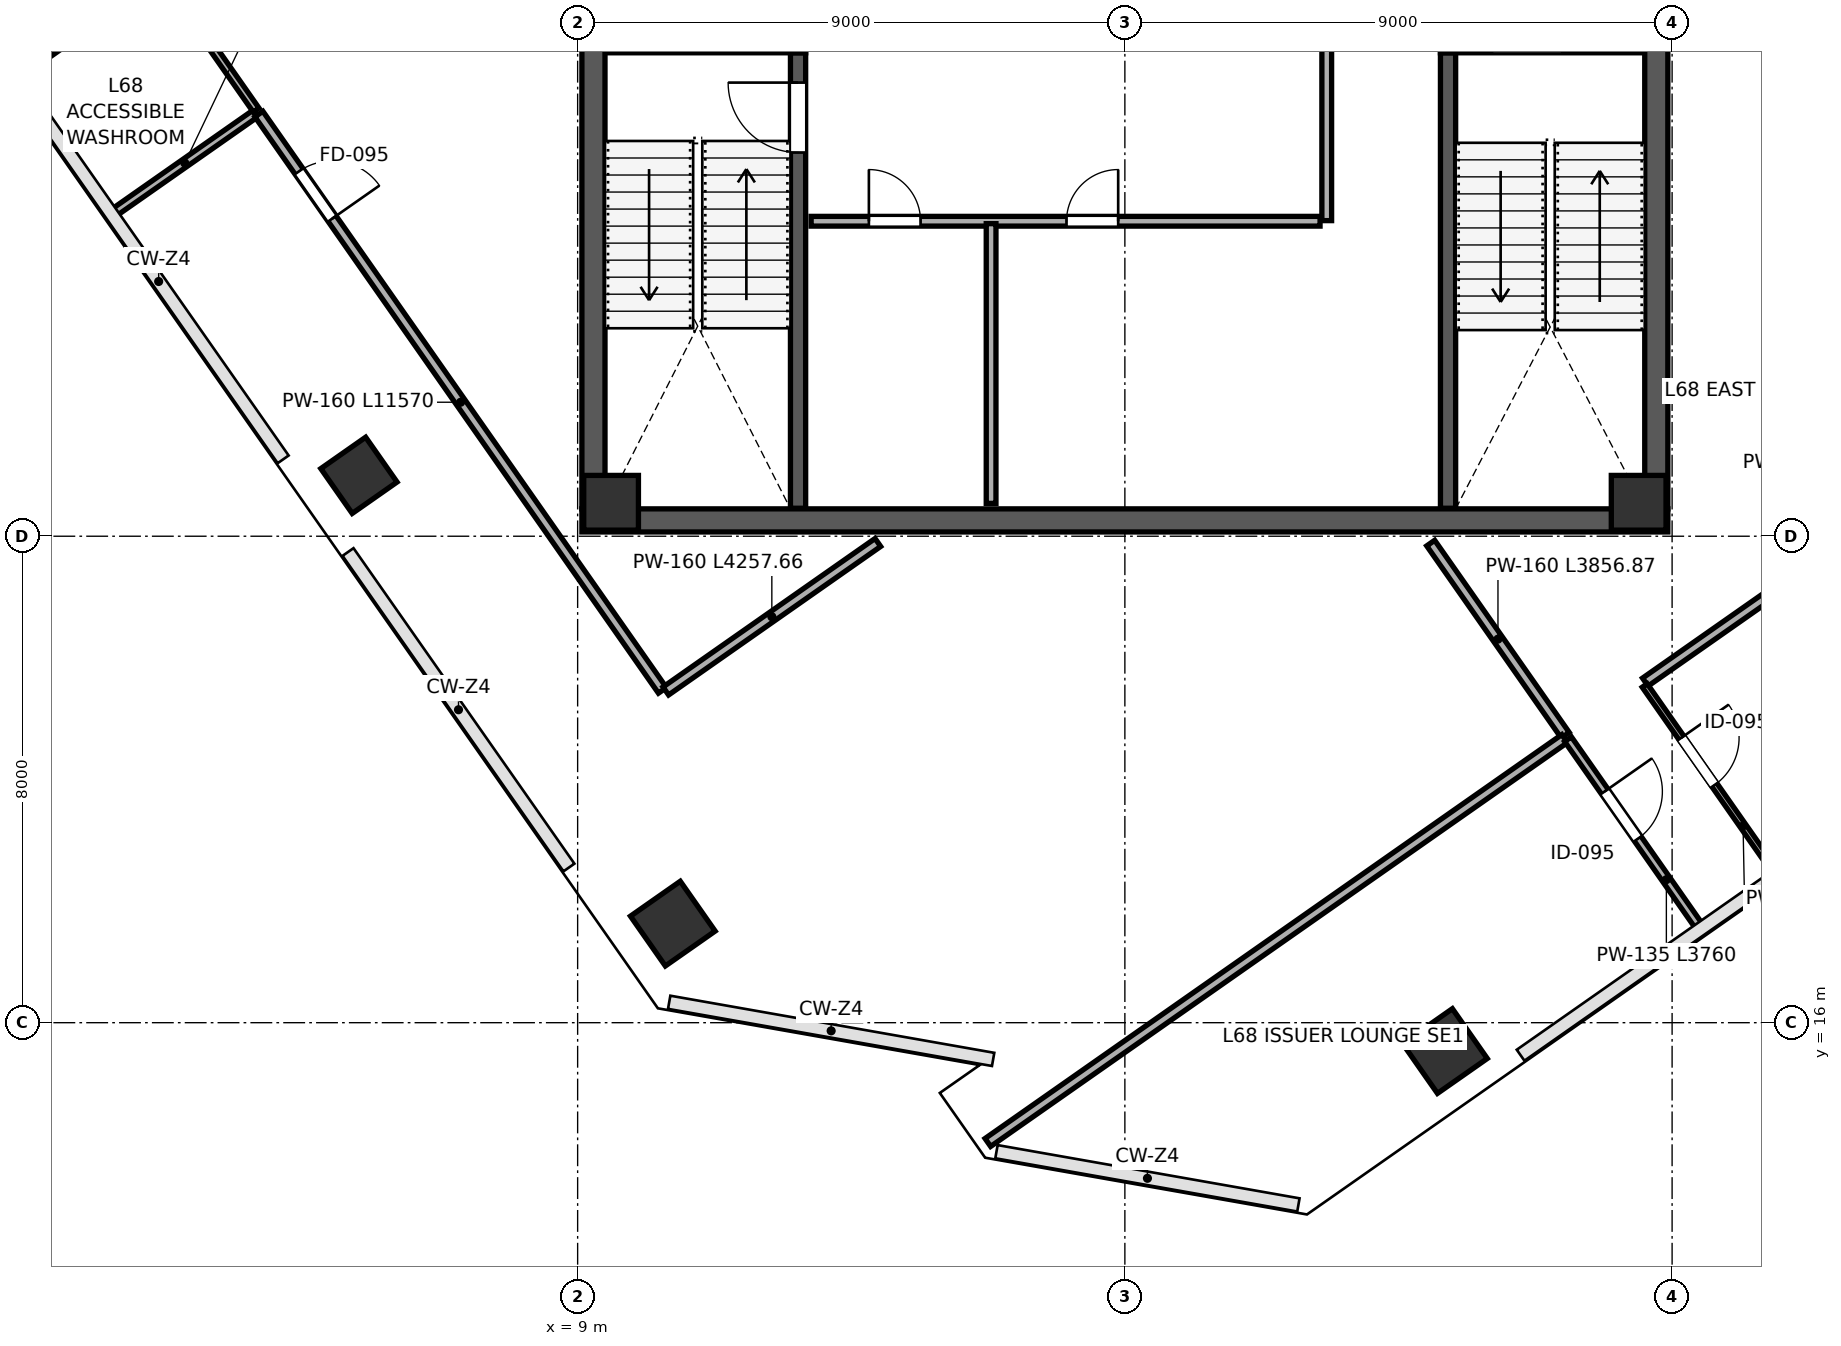
"""IFC4 building model, lengths in metres.
Left out: names, types, materials, properties, quantities, classifications, styles, units other than length and angle.
Written with IfcOpenShell. Run it as: python <this file> out.ifc"""

import sys

from ifc_helpers import new_model, si_unit, direction, frame, frame_2d, origin, origin_2d, place, context, subcontext, project, spatial, rectangle, extrude, clip, halfspace, source, transform, mapped, element, fill, save


model = new_model("IFC4")
c1 = context("Model", 3, precision=1e-05, world=origin(), true_north=direction((0.0, 1.0)))
c2 = subcontext(c1, "Body", "Model", "MODEL_VIEW")
j1 = project(units=[si_unit("LENGTHUNIT", "METRE"), si_unit("PLANEANGLEUNIT", "RADIAN")], contexts=[c1])
p1 = place(None, origin())
s1 = spatial("IfcSite", under=j1, at=p1, CompositionType="ELEMENT")
p2 = place(p1, origin())
s2 = spatial("IfcBuilding", under=s1, at=p2, CompositionType="ELEMENT")
p3 = place(p2, frame((0.0, 0.0, 303.0)))
s3 = spatial("IfcBuildingStorey", under=s2, at=p3, CompositionType="ELEMENT", Elevation=303.0)
m1 = source(origin(), c2, "Body", "SweptSolid", [
    extrude(rectangle(XDim=0.9, YDim=0.9, at=origin_2d()), origin(), (0.0, 0.0, 1.0), 4.198),
])
for number, where, z_axis, x_axis in (
    (1, (9.55, 24.55, 0.001), (0.0, 0.0, 1.0), (1.0, 0.0, 0.0)),
    (2, (26.45, 24.55, 0.001), (0.0, 0.0, 1.0), (1.0, 0.0, 0.0)),
):
    element("IfcColumn", number, at=place(p3, frame(where, z_axis=z_axis, x_axis=x_axis)), inside=s3, PredefinedType="COLUMN", context=c2, shape_type="MappedRepresentation", body=[
        mapped(m1, transform((0.0, 0.0, 0.0), scale=1.0)),
    ])
p4 = place(p3, frame((0.241, 32.374, 0.0), z_axis=(0.008457413638, 0.215522144854, 0.976462327605), x_axis=(0.541771313725, -0.821746656519, 0.176681284024)))
e3 = element("IfcColumn", 3, at=p4, inside=s3, PredefinedType="COLUMN", context=c2, shape_type="Clipping", body=[
    clip(clip(extrude(rectangle(XDim=0.9, YDim=0.9, at=origin_2d()), origin(), (0.0, 0.0, 1.0), 4.301), halfspace(frame((0.0, 0.0, 0.139), z_axis=(0.0, 0.0, -1.0), x_axis=(1.0, 0.0, 0.0)), False)), halfspace(frame((0.0, 0.0, 4.162), z_axis=(0.0, 0.0, 1.0), x_axis=(1.0, 0.0, 0.0)), False)),
])
p5 = place(p3, frame((5.403, 25.001, 0.0), z_axis=(-0.06793764826, 0.166012620285, 0.983780608599), x_axis=(0.836063035578, -0.528590930954, 0.146936136652)))
e4 = element("IfcColumn", 4, at=p5, inside=s3, PredefinedType="COLUMN", context=c2, shape_type="Clipping", body=[
    clip(clip(extrude(rectangle(XDim=0.9, YDim=0.9, at=origin_2d()), origin(), (0.0, 0.0, 1.0), 4.269), halfspace(frame((0.0, 0.0, 0.115), z_axis=(0.0, 0.0, -1.0), x_axis=(1.0, 0.0, 0.0)), False)), halfspace(frame((0.0, 0.0, 4.154), z_axis=(0.0, 0.0, 1.0), x_axis=(1.0, 0.0, 0.0)), False)),
])
p6 = place(p3, frame((10.565, 17.629, 0.0), z_axis=(-0.144260059709, 0.114836720798, 0.98285378502), x_axis=(0.987123386197, -0.0526699781, 0.151040702559)))
e5 = element("IfcColumn", 5, at=p6, inside=s3, PredefinedType="COLUMN", context=c2, shape_type="Clipping", body=[
    clip(clip(extrude(rectangle(XDim=1.0, YDim=1.0, at=origin_2d()), origin(), (0.0, 0.0, 1.0), 4.273), halfspace(frame((0.0, 0.0, 0.131), z_axis=(0.0, 0.0, -1.0), x_axis=(1.0, 0.0, 0.0)), False)), halfspace(frame((0.0, 0.0, 4.142), z_axis=(0.0, 0.0, 1.0), x_axis=(1.0, 0.0, 0.0)), False)),
])
p7 = place(p3, frame((23.264, 15.534, 0.0), z_axis=(-0.168941576354, -0.014379225387, 0.985521172607), x_axis=(0.755740055789, 0.639974029338, 0.1388891999)))
e6 = element("IfcColumn", 6, at=p7, inside=s3, PredefinedType="COLUMN", context=c2, shape_type="Clipping", body=[
    clip(clip(extrude(rectangle(XDim=1.0, YDim=1.0, at=origin_2d()), origin(), (0.0, 0.0, 1.0), 4.262), halfspace(frame((0.0, 0.0, 0.121), z_axis=(0.0, 0.0, -1.0), x_axis=(1.0, 0.0, 0.0)), False)), halfspace(frame((0.0, 0.0, 4.141), z_axis=(0.0, 0.0, 1.0), x_axis=(1.0, 0.0, 0.0)), False)),
])
p8 = place(p3, frame((9.26, 24.45, 0.0), z_axis=(0.0, 0.0, 1.0), x_axis=(0.0, 1.0, 0.0)))
e7 = element("IfcWall", 7, at=p8, inside=s3, PredefinedType="SHEAR", context=c2, shape_type="SweptSolid", body=[
    extrude(rectangle(XDim=15.1, YDim=0.38, at=frame_2d((7.55, 0.0))), origin(), (0.0, 0.0, 1.0), 3.96),
])
p9 = place(p8, frame((8.7, 0.0, 0.0)))
e8 = element("IfcOpeningElement", 8, at=p9, cuts=e7, PredefinedType="OPENING", context=c2, shape_type="SweptSolid", body=[
    extrude(rectangle(XDim=1.15, YDim=2.2, at=frame_2d((0.575, 1.1))), frame((0.0, 0.2, 0.0), z_axis=(0.0, -1.0, 0.0), x_axis=(1.0, 0.0, 0.0)), (0.0, 0.0, 1.0), 0.4),
])
p10 = place(p3, frame((26.74, 24.45, 0.0), z_axis=(0.0, 0.0, 1.0), x_axis=(0.0, 1.0, 0.0)))
e9 = element("IfcWall", 9, at=p10, inside=s3, PredefinedType="SHEAR", context=c2, shape_type="SweptSolid", body=[
    extrude(rectangle(XDim=15.1, YDim=0.38, at=frame_2d((7.55, 0.0))), origin(), (0.0, 0.0, 1.0), 3.96),
])
p11 = place(p10, frame((8.6, 0.0, 0.0)))
e10 = element("IfcOpeningElement", 10, at=p11, cuts=e9, PredefinedType="OPENING", context=c2, shape_type="SweptSolid", body=[
    extrude(rectangle(XDim=1.15, YDim=2.2, at=frame_2d((0.575, 1.1))), frame((0.0, 0.2, 0.0), z_axis=(0.0, -1.0, 0.0), x_axis=(1.0, 0.0, 0.0)), (0.0, 0.0, 1.0), 0.4),
])
p12 = place(p3, frame((9.07, 24.26, 0.0), z_axis=(0.0, 0.0, 1.0), x_axis=(1.0, 0.0, 0.0)))
e11 = element("IfcWall", 11, at=p12, inside=s3, PredefinedType="SHEAR", context=c2, shape_type="SweptSolid", body=[
    extrude(rectangle(XDim=17.86, YDim=0.38, at=frame_2d((8.93, 0.0))), origin(), (0.0, 0.0, 1.0), 3.96),
])
p13 = place(p3, frame((12.625, 24.46, 0.0), z_axis=(0.0, 0.0, 1.0), x_axis=(0.0, 1.0, 0.0)))
e12 = element("IfcWall", 12, at=p13, inside=s3, PredefinedType="SHEAR", context=c2, shape_type="SweptSolid", body=[
    extrude(rectangle(XDim=7.49, YDim=0.25, at=frame_2d((3.745, 0.0))), origin(), (0.0, 0.0, 1.0), 3.96),
])
p14 = place(p13, frame((5.85, 0.0, 0.0)))
e13 = element("IfcOpeningElement", 13, at=p14, cuts=e12, PredefinedType="OPENING", context=c2, shape_type="SweptSolid", body=[
    extrude(rectangle(XDim=1.15, YDim=2.2, at=frame_2d((0.575, 1.1))), frame((0.0, 0.135, 0.0), z_axis=(0.0, -1.0, 0.0), x_axis=(1.0, 0.0, 0.0)), (0.0, 0.0, 1.0), 0.27),
])
p15 = place(p3, frame((9.46, 32.075, 0.0), z_axis=(0.0, 0.0, 1.0), x_axis=(1.0, 0.0, 0.0)))
e14 = element("IfcWall", 14, at=p15, inside=s3, PredefinedType="SHEAR", context=c2, shape_type="SweptSolid", body=[
    extrude(rectangle(XDim=3.29, YDim=0.25, at=frame_2d((1.645, 0.0))), origin(), (0.0, 0.0, 1.0), 3.96),
])
p16 = place(p3, frame((23.315, 24.46, 0.0), z_axis=(0.0, 0.0, 1.0), x_axis=(0.0, 1.0, 0.0)))
e15 = element("IfcWall", 15, at=p16, inside=s3, PredefinedType="SHEAR", context=c2, shape_type="SweptSolid", body=[
    extrude(rectangle(XDim=7.49, YDim=0.25, at=frame_2d((3.745, 0.0))), origin(), (0.0, 0.0, 1.0), 3.96),
])
p17 = place(p3, frame((23.19, 32.075, 0.0), z_axis=(0.0, 0.0, 1.0), x_axis=(1.0, 0.0, 0.0)))
e16 = element("IfcWall", 16, at=p17, inside=s3, PredefinedType="SHEAR", context=c2, shape_type="SweptSolid", body=[
    extrude(rectangle(XDim=3.35, YDim=0.25, at=frame_2d((1.675, 0.0))), origin(), (0.0, 0.0, 1.0), 3.96),
])
p18 = place(p17, frame((0.85, 0.0, 0.0)))
e17 = element("IfcOpeningElement", 17, at=p18, cuts=e16, PredefinedType="OPENING", context=c2, shape_type="SweptSolid", body=[
    extrude(rectangle(XDim=1.15, YDim=2.2, at=frame_2d((0.575, 1.1))), frame((0.0, 0.135, 0.0), z_axis=(0.0, -1.0, 0.0), x_axis=(1.0, 0.0, 0.0)), (0.0, 0.0, 1.0), 0.27),
])
p19 = place(p3, frame((12.84, 29.18, 0.0), z_axis=(0.0, 0.0, 1.0), x_axis=(1.0, 0.0, 0.0)))
e18 = element("IfcWall", 18, at=p19, inside=s3, PredefinedType="PARTITIONING", context=c2, shape_type="SweptSolid", body=[
    extrude(rectangle(XDim=8.37, YDim=0.16, at=frame_2d((4.185, 0.0))), origin(), (0.0, 0.0, 1.0), 3.96),
])
p20 = place(p19, frame((0.95, 0.0, 0.0)))
e19 = element("IfcOpeningElement", 19, at=p20, cuts=e18, PredefinedType="OPENING", context=c2, shape_type="SweptSolid", body=[
    extrude(rectangle(XDim=0.85, YDim=2.1, at=frame_2d((0.425, 1.05))), frame((0.0, 0.09, 0.0), z_axis=(0.0, -1.0, 0.0), x_axis=(1.0, 0.0, 0.0)), (0.0, 0.0, 1.0), 0.18),
])
p21 = place(p19, frame((4.2, 0.0, 0.0)))
e20 = element("IfcOpeningElement", 20, at=p21, cuts=e18, PredefinedType="OPENING", context=c2, shape_type="SweptSolid", body=[
    extrude(rectangle(XDim=0.85, YDim=2.1, at=frame_2d((0.425, 1.05))), frame((0.0, 0.09, 0.0), z_axis=(0.0, -1.0, 0.0), x_axis=(1.0, 0.0, 0.0)), (0.0, 0.0, 1.0), 0.18),
])
p22 = place(p3, frame((15.8, 24.54, 0.0), z_axis=(0.0, 0.0, 1.0), x_axis=(0.0, 1.0, 0.0)))
e21 = element("IfcWall", 21, at=p22, inside=s3, PredefinedType="PARTITIONING", context=c2, shape_type="SweptSolid", body=[
    extrude(rectangle(XDim=4.6, YDim=0.16, at=frame_2d((2.3, 0.0))), origin(), (0.0, 0.0, 1.0), 3.96),
])
p23 = place(p3, frame((21.32, 29.19, 0.0), z_axis=(0.0, 0.0, 1.0), x_axis=(0.0, 1.0, 0.0)))
e22 = element("IfcWall", 22, at=p23, inside=s3, PredefinedType="PARTITIONING", context=c2, shape_type="SweptSolid", body=[
    extrude(rectangle(XDim=2.92, YDim=0.16, at=frame_2d((1.46, 0.0))), origin(), (0.0, 0.0, 1.0), 3.96),
])
p24 = place(p3, frame((-0.431, 31.904, 0.0), z_axis=(0.0, 0.0, 1.0), x_axis=(0.819122867865, 0.573618102347, 0.0)))
e23 = element("IfcWall", 23, at=p24, inside=s3, PredefinedType="PARTITIONING", context=c2, shape_type="SweptSolid", body=[
    extrude(rectangle(XDim=2.84, YDim=0.1, at=frame_2d((1.42, 0.0))), origin(), (0.0, 0.0, 1.0), 3.295),
])
p25 = place(p3, frame((1.376, 29.323, 0.0), z_axis=(0.0, 0.0, 1.0), x_axis=(0.819163257805, 0.573560421458, 0.0)))
e24 = element("IfcWall", 24, at=p25, inside=s3, PredefinedType="PARTITIONING", context=c2, shape_type="SweptSolid", body=[
    extrude(rectangle(XDim=2.84, YDim=0.135, at=frame_2d((1.42, 0.0))), origin(), (0.0, 0.0, 1.0), 3.295),
])
p26 = place(p3, frame((-0.544, 37.086, 0.0), z_axis=(0.0, 0.0, 1.0), x_axis=(0.573568336404, -0.819157715873, 0.0)))
e25 = element("IfcWall", 25, at=p26, inside=s3, PredefinedType="PARTITIONING", context=c2, shape_type="SweptSolid", body=[
    extrude(rectangle(XDim=7.42, YDim=0.115, at=frame_2d((3.71, 0.0))), origin(), (0.0, 0.0, 1.0), 3.96),
])
p27 = place(p26, frame((1.7, 0.0, 0.0)))
e26 = element("IfcOpeningElement", 26, at=p27, cuts=e25, PredefinedType="OPENING", context=c2, shape_type="SweptSolid", body=[
    extrude(rectangle(XDim=0.9, YDim=2.15, at=frame_2d((0.45, 1.075))), frame((0.0, 0.067, 0.0), z_axis=(0.0, -1.0, 0.0), x_axis=(1.0, 0.0, 0.0)), (0.0, 0.0, 1.0), 0.135),
])
p28 = place(p26, frame((5.0, 0.0, 0.0)))
e27 = element("IfcOpeningElement", 27, at=p28, cuts=e25, PredefinedType="OPENING", context=c2, shape_type="SweptSolid", body=[
    extrude(rectangle(XDim=0.95, YDim=2.15, at=frame_2d((0.475, 1.075))), frame((0.0, 0.067, 0.0), z_axis=(0.0, -1.0, 0.0), x_axis=(1.0, 0.0, 0.0)), (0.0, 0.0, 1.0), 0.135),
])
p29 = place(p3, frame((3.758, 30.942, 0.0), z_axis=(0.0, 0.0, 1.0), x_axis=(0.573575634469, -0.819152605772, 0.0)))
e28 = element("IfcWall", 28, at=p29, inside=s3, PredefinedType="PARTITIONING", context=c2, shape_type="SweptSolid", body=[
    extrude(rectangle(XDim=11.57, YDim=0.16, at=frame_2d((5.785, 0.0))), origin(), (0.0, 0.0, 1.0), 3.96),
])
p30 = place(p29, frame((1.15, 0.0, 0.0)))
e29 = element("IfcOpeningElement", 29, at=p30, cuts=e28, PredefinedType="OPENING", context=c2, shape_type="SweptSolid", body=[
    extrude(rectangle(XDim=0.95, YDim=2.15, at=frame_2d((0.475, 1.075))), frame((0.0, 0.09, 0.0), z_axis=(0.0, -1.0, 0.0), x_axis=(1.0, 0.0, 0.0)), (0.0, 0.0, 1.0), 0.18),
])
p31 = place(p3, frame((10.45, 21.455, 0.0), z_axis=(0.0, 0.0, 1.0), x_axis=(0.819110678768, 0.573635507903, 0.0)))
e30 = element("IfcWall", 30, at=p31, inside=s3, PredefinedType="PARTITIONING", context=c2, shape_type="SweptSolid", body=[
    extrude(rectangle(XDim=4.258, YDim=0.16, at=frame_2d((2.129, 0.0))), origin(), (0.0, 0.0, 1.0), 3.96),
])
p32 = place(p3, frame((23.03, 23.887, 0.0), z_axis=(0.0, 0.0, 1.0), x_axis=(0.573602525203, -0.819133776059, 0.0)))
e31 = element("IfcWall", 31, at=p32, inside=s3, PredefinedType="PARTITIONING", context=c2, shape_type="SweptSolid", body=[
    extrude(rectangle(XDim=3.857, YDim=0.16, at=frame_2d((1.928, 0.0))), origin(), (0.0, 0.0, 1.0), 3.96),
])
p33 = place(p3, frame((21.918, 49.884, 0.0), z_axis=(0.0, 0.0, 1.0), x_axis=(0.57358495776, -0.819146077468, 0.0)))
e32 = element("IfcWall", 32, at=p33, inside=s3, PredefinedType="PARTITIONING", context=c2, shape_type="SweptSolid", body=[
    extrude(rectangle(XDim=25.79, YDim=0.1, at=frame_2d((12.895, 0.0))), origin(), (0.0, 0.0, 1.0), 3.96),
])
p34 = place(p33, frame((9.2, 0.0, 0.0)))
e33 = element("IfcOpeningElement", 33, at=p34, cuts=e32, PredefinedType="OPENING", context=c2, shape_type="SweptSolid", body=[
    extrude(rectangle(XDim=0.95, YDim=2.15, at=frame_2d((0.475, 1.075))), frame((0.0, 0.06, 0.0), z_axis=(0.0, -1.0, 0.0), x_axis=(1.0, 0.0, 0.0)), (0.0, 0.0, 1.0), 0.12),
])
p35 = place(p3, frame((26.559, 21.601, 0.0), z_axis=(0.0, 0.0, 1.0), x_axis=(0.819143682501, 0.573588378036, 0.0)))
e34 = element("IfcWall", 34, at=p35, inside=s3, PredefinedType="PARTITIONING", context=c2, shape_type="SweptSolid", body=[
    extrude(rectangle(XDim=9.49, YDim=0.16, at=frame_2d((4.745, 0.0))), origin(), (0.0, 0.0, 1.0), 3.96),
])
p36 = place(p3, frame((15.747, 14.03, 0.0), z_axis=(0.0, 0.0, 1.0), x_axis=(0.819150694041, 0.573578364701, 0.0)))
e35 = element("IfcWall", 35, at=p36, inside=s3, PredefinedType="PARTITIONING", context=c2, shape_type="SweptSolid", body=[
    extrude(rectangle(XDim=11.58, YDim=0.16, at=frame_2d((5.79, 0.0))), origin(), (0.0, 0.0, 1.0), 3.96),
])
p37 = place(p3, frame((26.55, 21.546, 0.0), z_axis=(0.0, 0.0, 1.0), x_axis=(0.573614860738, -0.8191251379, 0.0)))
e36 = element("IfcWall", 36, at=p37, inside=s3, PredefinedType="PARTITIONING", context=c2, shape_type="SweptSolid", body=[
    extrude(rectangle(XDim=3.76, YDim=0.1, at=frame_2d((1.88, 0.0))), origin(), (0.0, 0.0, 1.0), 3.96),
])
p38 = place(p37, frame((1.05, 0.0, 0.0)))
e37 = element("IfcOpeningElement", 37, at=p38, cuts=e36, PredefinedType="OPENING", context=c2, shape_type="SweptSolid", body=[
    extrude(rectangle(XDim=0.95, YDim=2.15, at=frame_2d((0.475, 1.075))), frame((0.0, 0.06, 0.0), z_axis=(0.0, -1.0, 0.0), x_axis=(1.0, 0.0, 0.0)), (0.0, 0.0, 1.0), 0.12),
])
p39 = place(p3, frame((25.288, 20.662, 0.0), z_axis=(0.0, 0.0, 1.0), x_axis=(0.573614860738, -0.8191251379, 0.0)))
e38 = element("IfcWall", 38, at=p39, inside=s3, PredefinedType="PARTITIONING", context=c2, shape_type="SweptSolid", body=[
    extrude(rectangle(XDim=3.76, YDim=0.135, at=frame_2d((1.88, 0.0))), origin(), (0.0, 0.0, 1.0), 3.96),
])
p40 = place(p39, frame((1.05, 0.0, 0.0)))
e39 = element("IfcOpeningElement", 39, at=p40, cuts=e38, PredefinedType="OPENING", context=c2, shape_type="SweptSolid", body=[
    extrude(rectangle(XDim=0.95, YDim=2.15, at=frame_2d((0.475, 1.075))), frame((0.0, 0.078, 0.0), z_axis=(0.0, -1.0, 0.0), x_axis=(1.0, 0.0, 0.0)), (0.0, 0.0, 1.0), 0.155),
])
m2 = source(origin(), c2, "Body", "SweptSolid", [
    extrude(rectangle(XDim=1.15, YDim=2.2, at=frame_2d((0.575, 1.1))), frame((0.0, 0.025, 0.0), z_axis=(0.0, -1.0, 0.0), x_axis=(1.0, 0.0, 0.0)), (0.0, 0.0, 1.0), 0.05),
])
p41 = place(p14, origin())
e40 = element("IfcDoor", 40, at=p41, inside=s3, OperationType="SINGLE_SWING_RIGHT", PredefinedType="DOOR", context=c2, shape_type="MappedRepresentation", body=[
    mapped(m2, transform((0.0, 0.0, 0.0), scale=1.0)),
])
fill(e13, e40)
m3 = source(origin(), c2, "Body", "SweptSolid", [
    extrude(rectangle(XDim=0.85, YDim=2.1, at=frame_2d((0.425, 1.05))), frame((0.0, 0.025, 0.0), z_axis=(0.0, -1.0, 0.0), x_axis=(1.0, 0.0, 0.0)), (0.0, 0.0, 1.0), 0.05),
])
p42 = place(p20, origin())
e41 = element("IfcDoor", 41, at=p42, inside=s3, OperationType="SINGLE_SWING_LEFT", PredefinedType="DOOR", context=c2, shape_type="MappedRepresentation", body=[
    mapped(m3, transform((0.0, 0.0, 0.0), scale=1.0)),
])
fill(e19, e41)
p43 = place(p21, origin())
e42 = element("IfcDoor", 42, at=p43, inside=s3, OperationType="SINGLE_SWING_RIGHT", PredefinedType="DOOR", context=c2, shape_type="MappedRepresentation", body=[
    mapped(m3, transform((0.0, 0.0, 0.0), scale=1.0)),
])
fill(e20, e42)
m4 = source(origin(), c2, "Body", "SweptSolid", [
    extrude(rectangle(XDim=0.95, YDim=2.15, at=frame_2d((0.475, 1.075))), frame((0.0, 0.025, 0.0), z_axis=(0.0, -1.0, 0.0), x_axis=(1.0, 0.0, 0.0)), (0.0, 0.0, 1.0), 0.05),
])
p44 = place(p30, origin())
e43 = element("IfcDoor", 43, at=p44, inside=s3, OperationType="SINGLE_SWING_RIGHT", PredefinedType="DOOR", context=c2, shape_type="MappedRepresentation", body=[
    mapped(m4, transform((0.0, 0.0, 0.0), scale=1.0)),
])
fill(e29, e43)
m5 = source(origin(), c2, "Body", "SweptSolid", [
    extrude(rectangle(XDim=0.95, YDim=2.15, at=frame_2d((0.475, 1.075))), frame((0.0, 0.025, 0.0), z_axis=(0.0, -1.0, 0.0), x_axis=(1.0, 0.0, 0.0)), (0.0, 0.0, 1.0), 0.05),
])
p45 = place(p38, origin())
e44 = element("IfcDoor", 44, at=p45, inside=s3, OperationType="SINGLE_SWING_LEFT", PredefinedType="DOOR", context=c2, shape_type="MappedRepresentation", body=[
    mapped(m5, transform((0.0, 0.0, 0.0), scale=1.0)),
])
fill(e37, e44)
p46 = place(p40, origin())
e45 = element("IfcDoor", 45, at=p46, inside=s3, OperationType="SINGLE_SWING_LEFT", PredefinedType="DOOR", context=c2, shape_type="MappedRepresentation", body=[
    mapped(m5, transform((0.0, 0.0, 0.0), scale=1.0)),
])
fill(e39, e45)
save(model, sys.argv[1])
